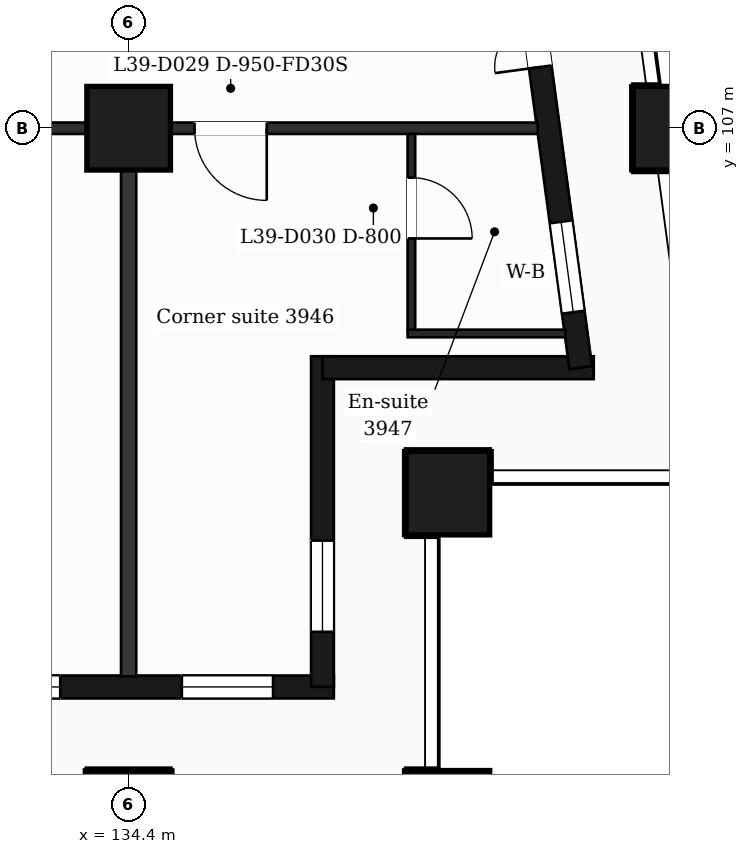
"""IFC4 building model, lengths in metres.
Left out: names, types, materials, properties, quantities, classifications, styles, units other than length and angle.
Written with IfcOpenShell. Run it as: python <this file> out.ifc"""

import sys

from ifc_helpers import new_model, si_unit, direction, frame, frame_2d, origin, origin_2d, place, context, subcontext, project, spatial, rectangle, extrude, element, fill, save


model = new_model("IFC4")
c1 = context("Model", 3, precision=1e-05, world=origin(), true_north=direction((0.0, 1.0)))
c2 = subcontext(c1, "Body", "Model", "MODEL_VIEW")
j1 = project(units=[si_unit("LENGTHUNIT", "METRE"), si_unit("PLANEANGLEUNIT", "RADIAN")], contexts=[c1])
p1 = place(None, origin())
s1 = spatial("IfcSite", under=j1, at=p1, CompositionType="ELEMENT")
p2 = place(p1, origin())
s2 = spatial("IfcBuilding", under=s1, at=p2, CompositionType="ELEMENT")
p3 = place(p2, frame((0.0, 0.0, 166.3)))
s3 = spatial("IfcBuildingStorey", under=s2, at=p3, CompositionType="ELEMENT", Elevation=166.3)
for number, where, z_axis, x_axis in (
    (1, (134.4, 98.0, 0.0), (0.0, 0.0, 1.0), (1.0, 0.0, 0.0)),
    (2, (138.6, 98.0, 0.0), (0.0, 0.0, 1.0), (1.0, 0.0, 0.0)),
    (3, (138.6, 102.2, 0.0), (0.0, 0.0, 1.0), (1.0, 0.0, 0.0)),
    (4, (134.4, 107.0, 0.0), (0.0, 0.0, 1.0), (1.0, 0.0, 0.0)),
    (5, (141.588, 107.0, 0.0), (0.0, 0.0, 1.0), (1.0, 0.0, 0.0)),
):
    element("IfcColumn", number, at=place(p3, frame(where, z_axis=z_axis, x_axis=x_axis)), inside=s3, PredefinedType="COLUMN", context=c2, shape_type="SweptSolid", body=[
        extrude(rectangle(XDim=1.1, YDim=1.1, at=origin_2d()), origin(), (0.0, 0.0, 1.0), 3.7),
    ])
p4 = place(p3, frame((89.85, 99.65, 0.0), z_axis=(0.0, 0.0, 1.0), x_axis=(1.0, 0.0, 0.0)))
e6 = element("IfcWall", 6, at=p4, inside=s3, PredefinedType="SOLIDWALL", context=c2, shape_type="SweptSolid", body=[
    extrude(rectangle(XDim=47.25, YDim=0.3, at=frame_2d((23.625, 0.0))), origin(), (0.0, 0.0, 1.0), 3.38),
])
p5 = place(p4, frame((0.725, 0.0, 0.9)))
e7 = element("IfcOpeningElement", 7, at=p5, cuts=e6, PredefinedType="OPENING", context=c2, shape_type="SweptSolid", body=[
    extrude(rectangle(XDim=1.2, YDim=2.1, at=frame_2d((0.6, 1.05))), frame((0.0, 0.16, 0.0), z_axis=(0.0, -1.0, 0.0), x_axis=(1.0, 0.0, 0.0)), (0.0, 0.0, 1.0), 0.32),
])
p6 = place(p4, frame((3.45, 0.0, 0.9)))
e8 = element("IfcOpeningElement", 8, at=p6, cuts=e6, PredefinedType="OPENING", context=c2, shape_type="SweptSolid", body=[
    extrude(rectangle(XDim=2.4, YDim=2.1, at=frame_2d((1.2, 1.05))), frame((0.0, 0.16, 0.0), z_axis=(0.0, -1.0, 0.0), x_axis=(1.0, 0.0, 0.0)), (0.0, 0.0, 1.0), 0.32),
])
p7 = place(p4, frame((7.35, 0.0, 0.0)))
e9 = element("IfcOpeningElement", 9, at=p7, cuts=e6, PredefinedType="OPENING", context=c2, shape_type="SweptSolid", body=[
    extrude(rectangle(XDim=1.2, YDim=2.4, at=frame_2d((0.6, 1.2))), frame((0.0, 0.16, 0.0), z_axis=(0.0, -1.0, 0.0), x_axis=(1.0, 0.0, 0.0)), (0.0, 0.0, 1.0), 0.32),
])
p8 = place(p4, frame((9.15, 0.0, 0.9)))
e10 = element("IfcOpeningElement", 10, at=p8, cuts=e6, PredefinedType="OPENING", context=c2, shape_type="SweptSolid", body=[
    extrude(rectangle(XDim=1.2, YDim=2.1, at=frame_2d((0.6, 1.05))), frame((0.0, 0.16, 0.0), z_axis=(0.0, -1.0, 0.0), x_axis=(1.0, 0.0, 0.0)), (0.0, 0.0, 1.0), 0.32),
])
p9 = place(p4, frame((11.85, 0.0, 0.9)))
e11 = element("IfcOpeningElement", 11, at=p9, cuts=e6, PredefinedType="OPENING", context=c2, shape_type="SweptSolid", body=[
    extrude(rectangle(XDim=2.4, YDim=2.1, at=frame_2d((1.2, 1.05))), frame((0.0, 0.16, 0.0), z_axis=(0.0, -1.0, 0.0), x_axis=(1.0, 0.0, 0.0)), (0.0, 0.0, 1.0), 0.32),
])
p10 = place(p4, frame((16.05, 0.0, 0.9)))
e12 = element("IfcOpeningElement", 12, at=p10, cuts=e6, PredefinedType="OPENING", context=c2, shape_type="SweptSolid", body=[
    extrude(rectangle(XDim=2.4, YDim=2.1, at=frame_2d((1.2, 1.05))), frame((0.0, 0.16, 0.0), z_axis=(0.0, -1.0, 0.0), x_axis=(1.0, 0.0, 0.0)), (0.0, 0.0, 1.0), 0.32),
])
p11 = place(p4, frame((20.85, 0.0, 0.9)))
e13 = element("IfcOpeningElement", 13, at=p11, cuts=e6, PredefinedType="OPENING", context=c2, shape_type="SweptSolid", body=[
    extrude(rectangle(XDim=1.2, YDim=2.1, at=frame_2d((0.6, 1.05))), frame((0.0, 0.16, 0.0), z_axis=(0.0, -1.0, 0.0), x_axis=(1.0, 0.0, 0.0)), (0.0, 0.0, 1.0), 0.32),
])
p12 = place(p4, frame((25.05, 0.0, 0.9)))
e14 = element("IfcOpeningElement", 14, at=p12, cuts=e6, PredefinedType="OPENING", context=c2, shape_type="SweptSolid", body=[
    extrude(rectangle(XDim=1.2, YDim=2.1, at=frame_2d((0.6, 1.05))), frame((0.0, 0.16, 0.0), z_axis=(0.0, -1.0, 0.0), x_axis=(1.0, 0.0, 0.0)), (0.0, 0.0, 1.0), 0.32),
])
p13 = place(p4, frame((28.65, 0.0, 0.9)))
e15 = element("IfcOpeningElement", 15, at=p13, cuts=e6, PredefinedType="OPENING", context=c2, shape_type="SweptSolid", body=[
    extrude(rectangle(XDim=2.4, YDim=2.1, at=frame_2d((1.2, 1.05))), frame((0.0, 0.16, 0.0), z_axis=(0.0, -1.0, 0.0), x_axis=(1.0, 0.0, 0.0)), (0.0, 0.0, 1.0), 0.32),
])
p14 = place(p4, frame((32.85, 0.0, 0.9)))
e16 = element("IfcOpeningElement", 16, at=p14, cuts=e6, PredefinedType="OPENING", context=c2, shape_type="SweptSolid", body=[
    extrude(rectangle(XDim=2.4, YDim=2.1, at=frame_2d((1.2, 1.05))), frame((0.0, 0.16, 0.0), z_axis=(0.0, -1.0, 0.0), x_axis=(1.0, 0.0, 0.0)), (0.0, 0.0, 1.0), 0.32),
])
p15 = place(p4, frame((37.05, 0.0, 0.9)))
e17 = element("IfcOpeningElement", 17, at=p15, cuts=e6, PredefinedType="OPENING", context=c2, shape_type="SweptSolid", body=[
    extrude(rectangle(XDim=2.4, YDim=2.1, at=frame_2d((1.2, 1.05))), frame((0.0, 0.16, 0.0), z_axis=(0.0, -1.0, 0.0), x_axis=(1.0, 0.0, 0.0)), (0.0, 0.0, 1.0), 0.32),
])
p16 = place(p4, frame((41.25, 0.0, 0.9)))
e18 = element("IfcOpeningElement", 18, at=p16, cuts=e6, PredefinedType="OPENING", context=c2, shape_type="SweptSolid", body=[
    extrude(rectangle(XDim=2.4, YDim=2.1, at=frame_2d((1.2, 1.05))), frame((0.0, 0.16, 0.0), z_axis=(0.0, -1.0, 0.0), x_axis=(1.0, 0.0, 0.0)), (0.0, 0.0, 1.0), 0.32),
])
p17 = place(p4, frame((45.25, 0.0, 0.9)))
e19 = element("IfcOpeningElement", 19, at=p17, cuts=e6, PredefinedType="OPENING", context=c2, shape_type="SweptSolid", body=[
    extrude(rectangle(XDim=1.2, YDim=2.1, at=frame_2d((0.6, 1.05))), frame((0.0, 0.16, 0.0), z_axis=(0.0, -1.0, 0.0), x_axis=(1.0, 0.0, 0.0)), (0.0, 0.0, 1.0), 0.32),
])
p18 = place(p3, frame((136.95, 99.65, 0.0), z_axis=(0.0, 0.0, 1.0), x_axis=(0.0, 1.0, 0.0)))
e20 = element("IfcWall", 20, at=p18, inside=s3, PredefinedType="SOLIDWALL", context=c2, shape_type="SweptSolid", body=[
    extrude(rectangle(XDim=4.35, YDim=0.3, at=frame_2d((2.175, 0.0))), origin(), (0.0, 0.0, 1.0), 3.38),
])
p19 = place(p18, frame((0.725, 0.0, 0.9)))
e21 = element("IfcOpeningElement", 21, at=p19, cuts=e20, PredefinedType="OPENING", context=c2, shape_type="SweptSolid", body=[
    extrude(rectangle(XDim=1.2, YDim=2.1, at=frame_2d((0.6, 1.05))), frame((0.0, 0.16, 0.0), z_axis=(0.0, -1.0, 0.0), x_axis=(1.0, 0.0, 0.0)), (0.0, 0.0, 1.0), 0.32),
])
p20 = place(p3, frame((136.95, 103.85, 0.0), z_axis=(0.0, 0.0, 1.0), x_axis=(1.0, 0.0, 0.0)))
e22 = element("IfcWall", 22, at=p20, inside=s3, PredefinedType="SOLIDWALL", context=c2, shape_type="SweptSolid", body=[
    extrude(rectangle(XDim=3.569, YDim=0.3, at=frame_2d((1.785, 0.0))), origin(), (0.0, 0.0, 1.0), 3.38),
])
p21 = place(p3, frame((140.348, 103.85, 0.0), z_axis=(0.0, 0.0, 1.0), x_axis=(-0.133431549479, 0.991058031401, 0.0)))
e23 = element("IfcWall", 23, at=p21, inside=s3, PredefinedType="SOLIDWALL", context=c2, shape_type="SweptSolid", body=[
    extrude(rectangle(XDim=6.609, YDim=0.3, at=frame_2d((3.304, 0.0))), origin(), (0.0, 0.0, 1.0), 3.38),
])
p22 = place(p21, frame((0.737, 0.0, 0.9)))
e24 = element("IfcOpeningElement", 24, at=p22, cuts=e23, PredefinedType="OPENING", context=c2, shape_type="SweptSolid", body=[
    extrude(rectangle(XDim=1.2, YDim=2.1, at=frame_2d((0.6, 1.05))), frame((0.0, 0.16, 0.0), z_axis=(0.0, -1.0, 0.0), x_axis=(1.0, 0.0, 0.0)), (0.0, 0.0, 1.0), 0.32),
])
p23 = place(p21, frame((3.991, 0.0, 0.0)))
e25 = element("IfcOpeningElement", 25, at=p23, cuts=e23, PredefinedType="OPENING", context=c2, shape_type="SweptSolid", body=[
    extrude(rectangle(XDim=1.2, YDim=2.4, at=frame_2d((0.6, 1.2))), frame((0.0, 0.16, 0.0), z_axis=(0.0, -1.0, 0.0), x_axis=(1.0, 0.0, 0.0)), (0.0, 0.0, 1.0), 0.32),
])
p24 = place(p3, frame((138.07, 104.3, 0.0), z_axis=(0.0, 0.0, 1.0), x_axis=(1.0, 0.0, 0.0)))
e26 = element("IfcWall", 26, at=p24, inside=s3, PredefinedType="PARTITIONING", context=c2, shape_type="SweptSolid", body=[
    extrude(rectangle(XDim=2.076, YDim=0.1, at=frame_2d((1.038, 0.0))), origin(), (0.0, 0.0, 1.0), 3.38),
])
p25 = place(p3, frame((87.018, 107.0, 0.0), z_axis=(0.0, 0.0, 1.0), x_axis=(1.0, 0.0, 0.0)))
e27 = element("IfcWall", 27, at=p25, inside=s3, PredefinedType="PARTITIONING", context=c2, shape_type="SweptSolid", body=[
    extrude(rectangle(XDim=52.765, YDim=0.15, at=frame_2d((26.382, 0.0))), origin(), (0.0, 0.0, 1.0), 3.38),
])
p26 = place(p25, frame((0.463, 0.0, 0.0)))
e28 = element("IfcOpeningElement", 28, at=p26, cuts=e27, PredefinedType="OPENING", context=c2, shape_type="SweptSolid", body=[
    extrude(rectangle(XDim=0.95, YDim=2.1, at=frame_2d((0.475, 1.05))), frame((0.0, 0.085, 0.0), z_axis=(0.0, -1.0, 0.0), x_axis=(1.0, 0.0, 0.0)), (0.0, 0.0, 1.0), 0.17),
])
p27 = place(p25, frame((6.369, 0.0, 0.0)))
e29 = element("IfcOpeningElement", 29, at=p27, cuts=e27, PredefinedType="OPENING", context=c2, shape_type="SweptSolid", body=[
    extrude(rectangle(XDim=0.95, YDim=2.1, at=frame_2d((0.475, 1.05))), frame((0.0, 0.085, 0.0), z_axis=(0.0, -1.0, 0.0), x_axis=(1.0, 0.0, 0.0)), (0.0, 0.0, 1.0), 0.17),
])
p28 = place(p25, frame((9.857, 0.0, 0.0)))
e30 = element("IfcOpeningElement", 30, at=p28, cuts=e27, PredefinedType="OPENING", context=c2, shape_type="SweptSolid", body=[
    extrude(rectangle(XDim=0.95, YDim=2.1, at=frame_2d((0.475, 1.05))), frame((0.0, 0.085, 0.0), z_axis=(0.0, -1.0, 0.0), x_axis=(1.0, 0.0, 0.0)), (0.0, 0.0, 1.0), 0.17),
])
p29 = place(p25, frame((15.382, 0.0, 0.0)))
e31 = element("IfcOpeningElement", 31, at=p29, cuts=e27, PredefinedType="OPENING", context=c2, shape_type="SweptSolid", body=[
    extrude(rectangle(XDim=1.0, YDim=2.1, at=frame_2d((0.5, 1.05))), frame((0.0, 0.085, 0.0), z_axis=(0.0, -1.0, 0.0), x_axis=(1.0, 0.0, 0.0)), (0.0, 0.0, 1.0), 0.17),
])
p30 = place(p25, frame((24.932, 0.0, 0.0)))
e32 = element("IfcOpeningElement", 32, at=p30, cuts=e27, PredefinedType="OPENING", context=c2, shape_type="SweptSolid", body=[
    extrude(rectangle(XDim=1.0, YDim=2.1, at=frame_2d((0.5, 1.05))), frame((0.0, 0.085, 0.0), z_axis=(0.0, -1.0, 0.0), x_axis=(1.0, 0.0, 0.0)), (0.0, 0.0, 1.0), 0.17),
])
p31 = place(p25, frame((27.819, 0.0, 0.0)))
e33 = element("IfcOpeningElement", 33, at=p31, cuts=e27, PredefinedType="OPENING", context=c2, shape_type="SweptSolid", body=[
    extrude(rectangle(XDim=0.95, YDim=2.1, at=frame_2d((0.475, 1.05))), frame((0.0, 0.085, 0.0), z_axis=(0.0, -1.0, 0.0), x_axis=(1.0, 0.0, 0.0)), (0.0, 0.0, 1.0), 0.17),
])
p32 = place(p25, frame((42.012, 0.0, 0.0)))
e34 = element("IfcOpeningElement", 34, at=p32, cuts=e27, PredefinedType="OPENING", context=c2, shape_type="SweptSolid", body=[
    extrude(rectangle(XDim=1.0, YDim=2.1, at=frame_2d((0.5, 1.05))), frame((0.0, 0.085, 0.0), z_axis=(0.0, -1.0, 0.0), x_axis=(1.0, 0.0, 0.0)), (0.0, 0.0, 1.0), 0.17),
])
p33 = place(p25, frame((48.249, 0.0, 0.0)))
e35 = element("IfcOpeningElement", 35, at=p33, cuts=e27, PredefinedType="OPENING", context=c2, shape_type="SweptSolid", body=[
    extrude(rectangle(XDim=0.95, YDim=2.1, at=frame_2d((0.475, 1.05))), frame((0.0, 0.085, 0.0), z_axis=(0.0, -1.0, 0.0), x_axis=(1.0, 0.0, 0.0)), (0.0, 0.0, 1.0), 0.17),
])
p34 = place(p3, frame((134.4, 99.79, 0.0), z_axis=(0.0, 0.0, 1.0), x_axis=(0.0, 1.0, 0.0)))
e36 = element("IfcWall", 36, at=p34, inside=s3, PredefinedType="PARTITIONING", context=c2, shape_type="SweptSolid", body=[
    extrude(rectangle(XDim=7.135, YDim=0.2, at=frame_2d((3.567, 0.0))), origin(), (0.0, 0.0, 1.0), 3.38),
])
p35 = place(p3, frame((138.12, 104.35, 0.0), z_axis=(0.0, 0.0, 1.0), x_axis=(0.0, 1.0, 0.0)))
e37 = element("IfcWall", 37, at=p35, inside=s3, PredefinedType="PARTITIONING", context=c2, shape_type="SweptSolid", body=[
    extrude(rectangle(XDim=2.575, YDim=0.1, at=frame_2d((1.288, 0.0))), origin(), (0.0, 0.0, 1.0), 3.38),
])
p36 = place(p35, frame((1.2, 0.0, 0.0)))
e38 = element("IfcOpeningElement", 38, at=p36, cuts=e37, PredefinedType="OPENING", context=c2, shape_type="SweptSolid", body=[
    extrude(rectangle(XDim=0.8, YDim=2.1, at=frame_2d((0.4, 1.05))), frame((0.0, 0.06, 0.0), z_axis=(0.0, -1.0, 0.0), x_axis=(1.0, 0.0, 0.0)), (0.0, 0.0, 1.0), 0.12),
])
p37 = place(p16, origin())
e39 = element("IfcWindow", 39, at=p37, inside=s3, PartitioningType="SINGLE_PANEL", PredefinedType="WINDOW", context=c2, shape_type="SweptSolid", body=[
    extrude(rectangle(XDim=2.4, YDim=2.1, at=frame_2d((1.2, 1.05))), frame((0.0, 0.03, 0.0), z_axis=(0.0, -1.0, 0.0), x_axis=(1.0, 0.0, 0.0)), (0.0, 0.0, 1.0), 0.06),
])
fill(e18, e39)
p38 = place(p17, origin())
e40 = element("IfcWindow", 40, at=p38, inside=s3, PartitioningType="SINGLE_PANEL", PredefinedType="WINDOW", context=c2, shape_type="SweptSolid", body=[
    extrude(rectangle(XDim=1.2, YDim=2.1, at=frame_2d((0.6, 1.05))), frame((0.0, 0.03, 0.0), z_axis=(0.0, -1.0, 0.0), x_axis=(1.0, 0.0, 0.0)), (0.0, 0.0, 1.0), 0.06),
])
fill(e19, e40)
p39 = place(p19, origin())
e41 = element("IfcWindow", 41, at=p39, inside=s3, PartitioningType="SINGLE_PANEL", PredefinedType="WINDOW", context=c2, shape_type="SweptSolid", body=[
    extrude(rectangle(XDim=1.2, YDim=2.1, at=frame_2d((0.6, 1.05))), frame((0.0, 0.03, 0.0), z_axis=(0.0, -1.0, 0.0), x_axis=(1.0, 0.0, 0.0)), (0.0, 0.0, 1.0), 0.06),
])
fill(e21, e41)
p40 = place(p22, origin())
e42 = element("IfcWindow", 42, at=p40, inside=s3, PartitioningType="SINGLE_PANEL", PredefinedType="WINDOW", context=c2, shape_type="SweptSolid", body=[
    extrude(rectangle(XDim=1.2, YDim=2.1, at=frame_2d((0.6, 1.05))), frame((0.0, 0.03, 0.0), z_axis=(0.0, -1.0, 0.0), x_axis=(1.0, 0.0, 0.0)), (0.0, 0.0, 1.0), 0.06),
])
fill(e24, e42)
p41 = place(p23, origin())
e43 = element("IfcDoor", 43, at=p41, inside=s3, OperationType="DOUBLE_DOOR_SINGLE_SWING", PredefinedType="DOOR", context=c2, shape_type="SweptSolid", body=[
    extrude(rectangle(XDim=1.2, YDim=2.4, at=frame_2d((0.6, 1.2))), frame((0.0, 0.025, 0.0), z_axis=(0.0, -1.0, 0.0), x_axis=(1.0, 0.0, 0.0)), (0.0, 0.0, 1.0), 0.05),
])
fill(e25, e43)
p42 = place(p33, origin())
e44 = element("IfcDoor", 44, at=p42, inside=s3, OperationType="SINGLE_SWING_RIGHT", PredefinedType="DOOR", context=c2, shape_type="SweptSolid", body=[
    extrude(rectangle(XDim=0.95, YDim=2.1, at=frame_2d((0.475, 1.05))), frame((0.0, 0.025, 0.0), z_axis=(0.0, -1.0, 0.0), x_axis=(1.0, 0.0, 0.0)), (0.0, 0.0, 1.0), 0.05),
])
fill(e35, e44)
p43 = place(p36, origin())
e45 = element("IfcDoor", 45, at=p43, inside=s3, OperationType="SINGLE_SWING_LEFT", PredefinedType="DOOR", context=c2, shape_type="SweptSolid", body=[
    extrude(rectangle(XDim=0.8, YDim=2.1, at=frame_2d((0.4, 1.05))), frame((0.0, 0.025, 0.0), z_axis=(0.0, -1.0, 0.0), x_axis=(1.0, 0.0, 0.0)), (0.0, 0.0, 1.0), 0.05),
])
fill(e38, e45)
save(model, sys.argv[1])
